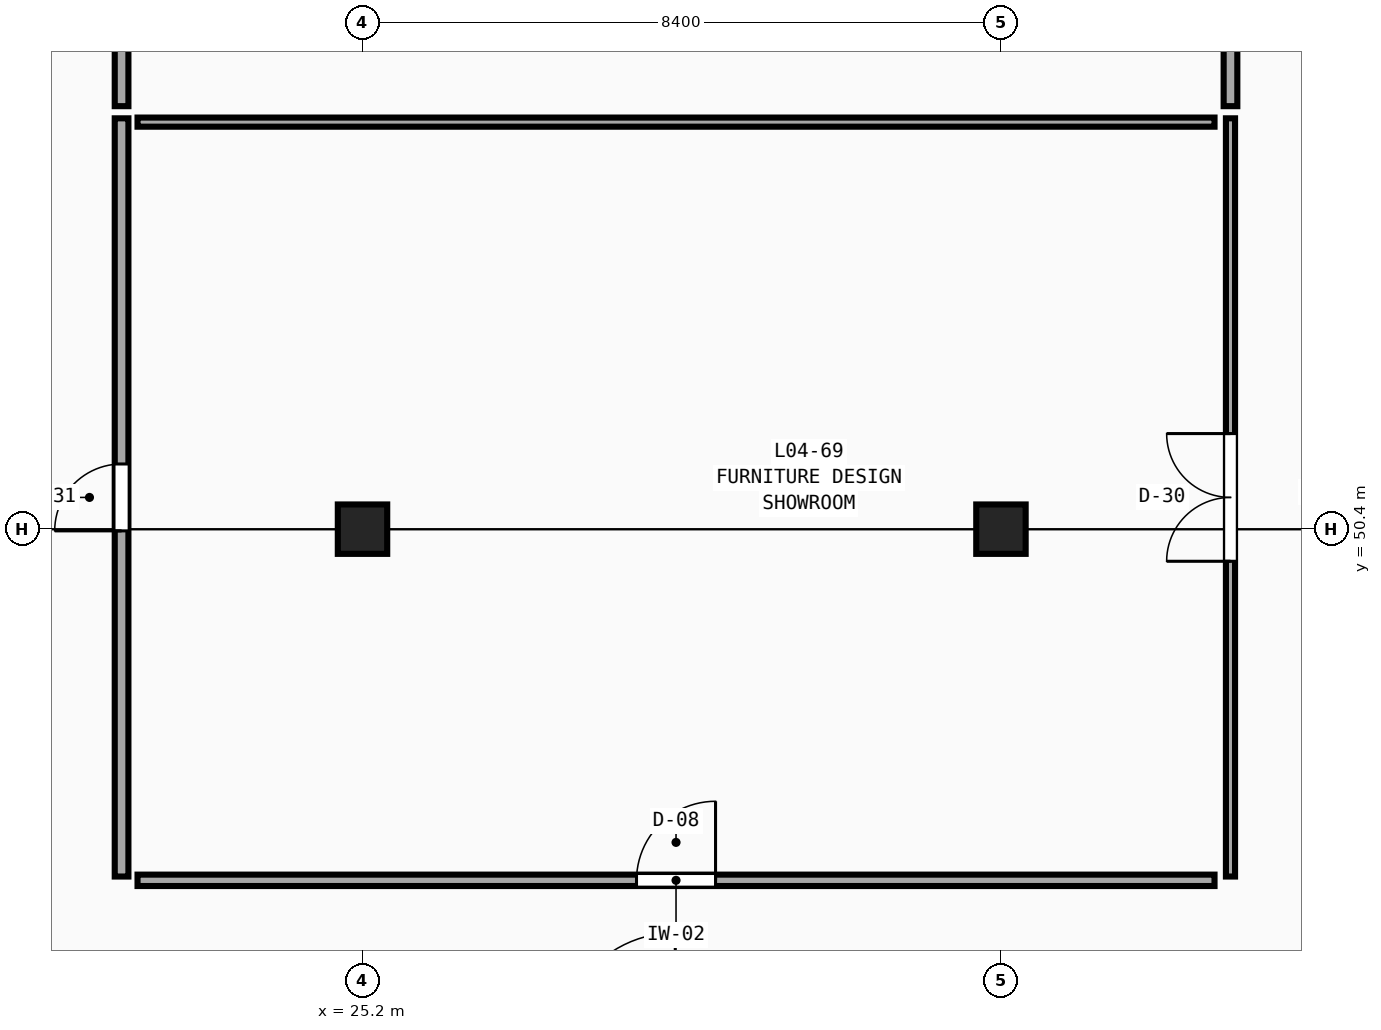
"""IFC4 building model, lengths in metres.
Left out: names, types, materials, properties, quantities, classifications, styles, units other than length and angle.
Written with IfcOpenShell. Run it as: python <this file> out.ifc"""

import sys

from ifc_helpers import new_model, si_unit, direction, frame, frame_2d, origin, origin_2d, place, context, subcontext, project, spatial, rectangle, extrude, element, fill, save


model = new_model("IFC4")
c1 = context("Model", 3, precision=1e-05, world=origin(), true_north=direction((0.0, 1.0)))
c2 = subcontext(c1, "Body", "Model", "MODEL_VIEW")
j1 = project(units=[si_unit("LENGTHUNIT", "METRE"), si_unit("PLANEANGLEUNIT", "RADIAN")], contexts=[c1])
p1 = place(None, origin())
s1 = spatial("IfcSite", under=j1, at=p1, CompositionType="ELEMENT")
p2 = place(p1, origin())
s2 = spatial("IfcBuilding", under=s1, at=p2, CompositionType="ELEMENT")
p3 = place(p2, frame((0.0, 0.0, 18.9)))
s3 = spatial("IfcBuildingStorey", under=s2, at=p3, CompositionType="ELEMENT", Elevation=18.9)
for number, where, z_axis, x_axis in (
    (1, (25.2, 50.4, 0.0), (0.0, 0.0, 1.0), (1.0, 0.0, 0.0)),
    (2, (33.6, 50.4, 0.0), (0.0, 0.0, 1.0), (1.0, 0.0, 0.0)),
):
    element("IfcColumn", number, at=place(p3, frame(where, z_axis=z_axis, x_axis=x_axis)), inside=s3, PredefinedType="COLUMN", context=c2, shape_type="SweptSolid", body=[
        extrude(rectangle(XDim=0.65, YDim=0.65, at=origin_2d()), origin(), (0.0, 0.0, 1.0), 4.5),
    ])
p4 = place(p3, frame((22.24, 45.78, 0.0), z_axis=(0.0, 0.0, 1.0), x_axis=(1.0, 0.0, 0.0)))
e3 = element("IfcWall", 3, at=p4, inside=s3, PredefinedType="PARTITIONING", context=c2, shape_type="SweptSolid", body=[
    extrude(rectangle(XDim=14.17, YDim=0.15, at=frame_2d((7.085, 0.0))), origin(), (0.0, 0.0, 1.0), 4.18),
])
p5 = place(p4, frame((6.565, 0.0, 0.0)))
e4 = element("IfcOpeningElement", 4, at=p5, cuts=e3, PredefinedType="OPENING", context=c2, shape_type="SweptSolid", body=[
    extrude(rectangle(XDim=1.04, YDim=2.13, at=frame_2d((0.52, 1.065))), frame((0.0, 0.095, 0.0), z_axis=(0.0, -1.0, 0.0), x_axis=(1.0, 0.0, 0.0)), (0.0, 0.0, 1.0), 0.19),
])
p6 = place(p3, frame((36.62, 55.965, 0.0), z_axis=(0.0, 0.0, 1.0), x_axis=(0.0, 1.0, 0.0)))
e5 = element("IfcWall", 5, at=p6, inside=s3, PredefinedType="PARTITIONING", context=c2, shape_type="SweptSolid", body=[
    extrude(rectangle(XDim=12.095, YDim=0.18, at=frame_2d((6.047, 0.0))), origin(), (0.0, 0.0, 1.0), 4.18),
])
p7 = place(p6, frame((5.607, 0.0, 0.0)))
e6 = element("IfcOpeningElement", 6, at=p7, cuts=e5, PredefinedType="OPENING", context=c2, shape_type="SweptSolid", body=[
    extrude(rectangle(XDim=0.88, YDim=2.21, at=frame_2d((0.44, 1.105))), frame((0.0, 0.11, 0.0), z_axis=(0.0, -1.0, 0.0), x_axis=(1.0, 0.0, 0.0)), (0.0, 0.0, 1.0), 0.22),
])
p8 = place(p3, frame((36.62, 45.83, 0.0), z_axis=(0.0, 0.0, 1.0), x_axis=(0.0, 1.0, 0.0)))
e7 = element("IfcWall", 7, at=p8, inside=s3, PredefinedType="PARTITIONING", context=c2, shape_type="SweptSolid", body=[
    extrude(rectangle(XDim=9.975, YDim=0.12, at=frame_2d((4.987, 0.0))), origin(), (0.0, 0.0, 1.0), 4.18),
])
p9 = place(p8, frame((4.147, 0.0, 0.0)))
e8 = element("IfcOpeningElement", 8, at=p9, cuts=e7, PredefinedType="OPENING", context=c2, shape_type="SweptSolid", body=[
    extrude(rectangle(XDim=1.68, YDim=2.37, at=frame_2d((0.84, 1.185))), frame((0.0, 0.08, 0.0), z_axis=(0.0, -1.0, 0.0), x_axis=(1.0, 0.0, 0.0)), (0.0, 0.0, 1.0), 0.16),
])
p10 = place(p3, frame((22.03, 45.83, 0.0), z_axis=(0.0, 0.0, 1.0), x_axis=(0.0, 1.0, 0.0)))
e9 = element("IfcWall", 9, at=p10, inside=s3, PredefinedType="PARTITIONING", context=c2, shape_type="SweptSolid", body=[
    extrude(rectangle(XDim=9.975, YDim=0.18, at=frame_2d((4.987, 0.0))), origin(), (0.0, 0.0, 1.0), 4.18),
])
p11 = place(p10, frame((4.548, 0.0, 0.0)))
e10 = element("IfcOpeningElement", 10, at=p11, cuts=e9, PredefinedType="OPENING", context=c2, shape_type="SweptSolid", body=[
    extrude(rectangle(XDim=0.88, YDim=2.45, at=frame_2d((0.44, 1.225))), frame((0.0, 0.11, 0.0), z_axis=(0.0, -1.0, 0.0), x_axis=(1.0, 0.0, 0.0)), (0.0, 0.0, 1.0), 0.22),
])
p12 = place(p3, frame((22.03, 55.965, 0.0), z_axis=(0.0, 0.0, 1.0), x_axis=(0.0, 1.0, 0.0)))
e11 = element("IfcWall", 11, at=p12, inside=s3, PredefinedType="PARTITIONING", context=c2, shape_type="SweptSolid", body=[
    extrude(rectangle(XDim=8.671, YDim=0.18, at=frame_2d((4.336, 0.0))), origin(), (0.0, 0.0, 1.0), 4.18),
])
p13 = place(p12, frame((3.656, 0.0, 0.0)))
e12 = element("IfcOpeningElement", 12, at=p13, cuts=e11, PredefinedType="OPENING", context=c2, shape_type="SweptSolid", body=[
    extrude(rectangle(XDim=1.36, YDim=2.05, at=frame_2d((0.68, 1.025))), frame((0.0, 0.11, 0.0), z_axis=(0.0, -1.0, 0.0), x_axis=(1.0, 0.0, 0.0)), (0.0, 0.0, 1.0), 0.22),
])
p14 = place(p3, frame((22.24, 55.755, 0.0), z_axis=(0.0, 0.0, 1.0), x_axis=(1.0, 0.0, 0.0)))
e13 = element("IfcWall", 13, at=p14, inside=s3, PredefinedType="PARTITIONING", context=c2, shape_type="SweptSolid", body=[
    extrude(rectangle(XDim=14.17, YDim=0.12, at=frame_2d((7.085, 0.0))), origin(), (0.0, 0.0, 1.0), 4.18),
])
p15 = place(p5, origin())
e14 = element("IfcDoor", 14, at=p15, inside=s3, OperationType="SINGLE_SWING_RIGHT", PredefinedType="DOOR", context=c2, shape_type="SweptSolid", body=[
    extrude(rectangle(XDim=1.04, YDim=2.13, at=frame_2d((0.52, 1.065))), frame((0.0, 0.025, 0.0), z_axis=(0.0, -1.0, 0.0), x_axis=(1.0, 0.0, 0.0)), (0.0, 0.0, 1.0), 0.05),
])
fill(e4, e14)
p16 = place(p9, origin())
e15 = element("IfcDoor", 15, at=p16, inside=s3, OperationType="DOUBLE_DOOR_SINGLE_SWING", PredefinedType="DOOR", context=c2, shape_type="SweptSolid", body=[
    extrude(rectangle(XDim=1.68, YDim=2.37, at=frame_2d((0.84, 1.185))), frame((0.0, 0.025, 0.0), z_axis=(0.0, -1.0, 0.0), x_axis=(1.0, 0.0, 0.0)), (0.0, 0.0, 1.0), 0.05),
])
fill(e8, e15)
p17 = place(p11, origin())
e16 = element("IfcDoor", 16, at=p17, inside=s3, OperationType="SINGLE_SWING_LEFT", PredefinedType="DOOR", context=c2, shape_type="SweptSolid", body=[
    extrude(rectangle(XDim=0.88, YDim=2.45, at=frame_2d((0.44, 1.225))), frame((0.0, 0.025, 0.0), z_axis=(0.0, -1.0, 0.0), x_axis=(1.0, 0.0, 0.0)), (0.0, 0.0, 1.0), 0.05),
])
fill(e10, e16)
save(model, sys.argv[1])
